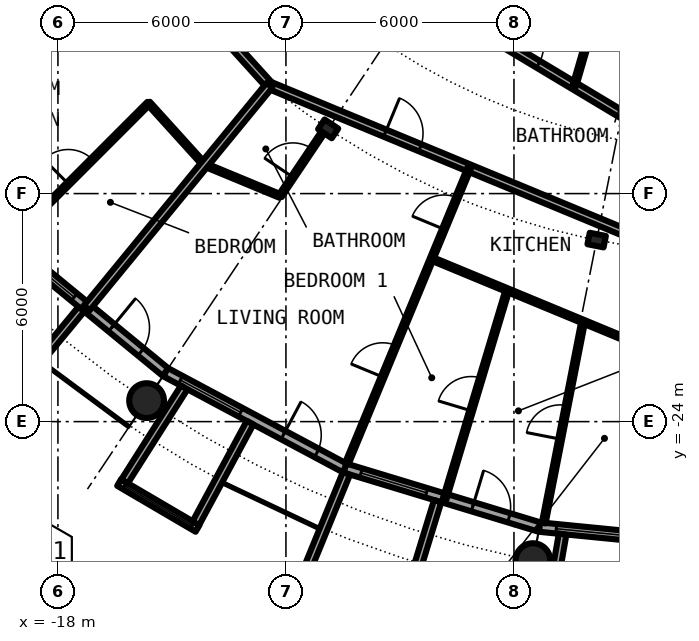
"""IFC4 building model, lengths in metres.
Left out: names, types, materials, properties, quantities, classifications, styles, units other than length and angle.
Written with IfcOpenShell. Run it as: python <this file> out.ifc"""

import sys

from ifc_helpers import new_model, si_unit, direction, frame, frame_2d, origin, origin_2d, place, context, subcontext, project, spatial, rectangle, circle, hollow_circle, i_section, extrude, element, fill, save


model = new_model("IFC4")
c1 = context("Model", 3, precision=1e-05, world=origin(), true_north=direction((0.0, 1.0)))
c2 = subcontext(c1, "Body", "Model", "MODEL_VIEW")
j1 = project(units=[si_unit("LENGTHUNIT", "METRE"), si_unit("PLANEANGLEUNIT", "RADIAN")], contexts=[c1])
p1 = place(None, origin())
s1 = spatial("IfcSite", under=j1, at=p1, CompositionType="ELEMENT")
p2 = place(p1, origin())
s2 = spatial("IfcBuilding", under=s1, at=p2, CompositionType="ELEMENT")
p3 = place(p2, frame((0.0, 0.0, 117.75)))
s3 = spatial("IfcBuildingStorey", under=s2, at=p3, CompositionType="ELEMENT", Elevation=117.75)
for number, where, z_axis, x_axis in (
    (1, (-15.667, -23.448, 0.0), (0.0, 0.0, 1.0), (1.0, 0.0, 0.0)),
    (2, (-5.501, -27.658, 0.0), (0.0, 0.0, 1.0), (1.0, 0.0, 0.0)),
):
    element("IfcColumn", number, at=place(p3, frame(where, z_axis=z_axis, x_axis=x_axis)), inside=s3, PredefinedType="COLUMN", context=c2, shape_type="SweptSolid", body=[
        extrude(hollow_circle(Radius=0.457, WallThickness=0.04, at=origin_2d()), origin(), (0.0, 0.0, 1.0), 3.05),
    ])
for number, where, z_axis, x_axis in (
    (3, (-10.889, -16.297, 0.0), (0.0, 0.0, 1.0), (-0.556, -0.831, 0.0)),
    (4, (-3.824, -19.223, 0.0), (0.0, 0.0, 1.0), (-0.195, -0.981, 0.0)),
):
    element("IfcColumn", number, at=place(p3, frame(where, z_axis=z_axis, x_axis=x_axis)), inside=s3, PredefinedType="COLUMN", context=c2, shape_type="SweptSolid", body=[
        extrude(i_section(OverallWidth=0.307, OverallDepth=0.432, WebThickness=0.021, FlangeThickness=0.04, FilletRadius=0.027, at=origin_2d()), origin(), (0.0, 0.0, 1.0), 3.05),
    ])
p4 = place(p3, frame((-19.304, -19.304, 0.0), z_axis=(0.0, 0.0, 1.0), x_axis=(0.773019449054, -0.634382322723, 0.0)))
e5 = element("IfcWall", 5, at=p4, inside=s3, PredefinedType="SOLIDWALL", context=c2, shape_type="SweptSolid", body=[
    extrude(rectangle(XDim=5.352, YDim=0.25, at=frame_2d((2.676, 0.0))), origin(), (0.0, 0.0, 1.0), 2.7),
])
p5 = place(p4, frame((0.441, 0.0, 0.3)))
e6 = element("IfcOpeningElement", 6, at=p5, cuts=e5, PredefinedType="OPENING", context=c2, shape_type="SweptSolid", body=[
    extrude(rectangle(XDim=1.8, YDim=2.1, at=frame_2d((0.9, 1.05))), frame((0.0, 0.135, 0.0), z_axis=(0.0, -1.0, 0.0), x_axis=(1.0, 0.0, 0.0)), (0.0, 0.0, 1.0), 0.27),
])
p6 = place(p4, frame((3.51, 0.0, 0.0)))
e7 = element("IfcOpeningElement", 7, at=p6, cuts=e5, PredefinedType="OPENING", context=c2, shape_type="SweptSolid", body=[
    extrude(rectangle(XDim=1.0, YDim=2.2, at=frame_2d((0.5, 1.1))), frame((0.0, 0.135, 0.0), z_axis=(0.0, -1.0, 0.0), x_axis=(1.0, 0.0, 0.0)), (0.0, 0.0, 1.0), 0.27),
])
p7 = place(p3, frame((-17.384, -21.041, -0.03), z_axis=(0.0, 0.0, 1.0), x_axis=(-0.63709551667, -0.770784861449, 0.0)))
e8 = element("IfcWall", 8, at=p7, inside=s3, PredefinedType="SOLIDWALL", context=c2, shape_type="SweptSolid", body=[
    extrude(rectangle(XDim=3.006, YDim=0.2, at=frame_2d((1.503, 0.0))), origin(), (0.0, 0.0, 1.0), 2.73),
])
p8 = place(p3, frame((-15.167, -22.699, 0.0), z_axis=(0.0, 0.0, 1.0), x_axis=(0.881915646801, -0.471407246368, 0.0)))
e9 = element("IfcWall", 9, at=p8, inside=s3, PredefinedType="SOLIDWALL", context=c2, shape_type="SweptSolid", body=[
    extrude(rectangle(XDim=5.352, YDim=0.25, at=frame_2d((2.676, 0.0))), origin(), (0.0, 0.0, 1.0), 2.7),
])
p9 = place(p8, frame((0.441, 0.0, 0.3)))
e10 = element("IfcOpeningElement", 10, at=p9, cuts=e9, PredefinedType="OPENING", context=c2, shape_type="SweptSolid", body=[
    extrude(rectangle(XDim=1.8, YDim=2.1, at=frame_2d((0.9, 1.05))), frame((0.0, 0.135, 0.0), z_axis=(0.0, -1.0, 0.0), x_axis=(1.0, 0.0, 0.0)), (0.0, 0.0, 1.0), 0.27),
])
p10 = place(p8, frame((3.51, 0.0, 0.0)))
e11 = element("IfcOpeningElement", 11, at=p10, cuts=e9, PredefinedType="OPENING", context=c2, shape_type="SweptSolid", body=[
    extrude(rectangle(XDim=1.0, YDim=2.2, at=frame_2d((0.5, 1.1))), frame((0.0, 0.135, 0.0), z_axis=(0.0, -1.0, 0.0), x_axis=(1.0, 0.0, 0.0)), (0.0, 0.0, 1.0), 0.27),
])
p11 = place(p3, frame((-16.39, -25.603, -0.03), z_axis=(0.0, 0.0, 1.0), x_axis=(0.862762477128, -0.505609442218, 0.0)))
e12 = element("IfcWall", 12, at=p11, inside=s3, PredefinedType="SOLIDWALL", context=c2, shape_type="SweptSolid", body=[
    extrude(rectangle(XDim=2.391, YDim=0.2, at=frame_2d((1.196, 0.0))), origin(), (0.0, 0.0, 1.0), 2.73),
])
p12 = place(p11, frame((0.156, 0.0, 0.33)))
e13 = element("IfcOpeningElement", 13, at=p12, cuts=e12, PredefinedType="OPENING", context=c2, shape_type="SweptSolid", body=[
    extrude(circle(Radius=1.04, at=frame_2d((1.04, 1.04))), frame((0.0, 0.11, 0.0), z_axis=(0.0, -1.0, 0.0), x_axis=(1.0, 0.0, 0.0)), (0.0, 0.0, 1.0), 0.22),
])
p13 = place(p3, frame((-14.678, -23.102, -0.03), z_axis=(0.0, 0.0, 1.0), x_axis=(-0.536001536573, -0.844217005746, 0.0)))
e14 = element("IfcWall", 14, at=p13, inside=s3, PredefinedType="SOLIDWALL", context=c2, shape_type="SweptSolid", body=[
    extrude(rectangle(XDim=2.929, YDim=0.2, at=frame_2d((1.465, 0.0))), origin(), (0.0, 0.0, 1.0), 2.73),
])
p14 = place(p3, frame((-12.945, -24.029, -0.03), z_axis=(0.0, 0.0, 1.0), x_axis=(-0.474424310775, -0.88029629861, 0.0)))
e15 = element("IfcWall", 15, at=p14, inside=s3, PredefinedType="SOLIDWALL", context=c2, shape_type="SweptSolid", body=[
    extrude(rectangle(XDim=3.006, YDim=0.2, at=frame_2d((1.503, 0.0))), origin(), (0.0, 0.0, 1.0), 2.73),
])
p15 = place(p3, frame((-10.447, -25.222, 0.0), z_axis=(0.0, 0.0, 1.0), x_axis=(0.956965678721, -0.290201119486, 0.0)))
e16 = element("IfcWall", 16, at=p15, inside=s3, PredefinedType="SOLIDWALL", context=c2, shape_type="SweptSolid", body=[
    extrude(rectangle(XDim=5.351, YDim=0.25, at=frame_2d((2.676, 0.0))), origin(), (0.0, 0.0, 1.0), 2.7),
])
p16 = place(p15, frame((0.441, 0.0, 0.3)))
e17 = element("IfcOpeningElement", 17, at=p16, cuts=e16, PredefinedType="OPENING", context=c2, shape_type="SweptSolid", body=[
    extrude(rectangle(XDim=1.8, YDim=2.1, at=frame_2d((0.9, 1.05))), frame((0.0, 0.135, 0.0), z_axis=(0.0, -1.0, 0.0), x_axis=(1.0, 0.0, 0.0)), (0.0, 0.0, 1.0), 0.27),
])
p17 = place(p15, frame((3.51, 0.0, 0.0)))
e18 = element("IfcOpeningElement", 18, at=p17, cuts=e16, PredefinedType="OPENING", context=c2, shape_type="SweptSolid", body=[
    extrude(rectangle(XDim=1.0, YDim=2.2, at=frame_2d((0.5, 1.1))), frame((0.0, 0.135, 0.0), z_axis=(0.0, -1.0, 0.0), x_axis=(1.0, 0.0, 0.0)), (0.0, 0.0, 1.0), 0.27),
])
p18 = place(p3, frame((-10.409, -25.364, -0.03), z_axis=(0.0, 0.0, 1.0), x_axis=(-0.379509886562, -0.925187681501, 0.0)))
e19 = element("IfcWall", 19, at=p18, inside=s3, PredefinedType="SOLIDWALL", context=c2, shape_type="SweptSolid", body=[
    extrude(rectangle(XDim=2.883, YDim=0.2, at=frame_2d((1.441, 0.0))), origin(), (0.0, 0.0, 1.0), 2.73),
])
p19 = place(p3, frame((-8.009, -26.092, -0.03), z_axis=(0.0, 0.0, 1.0), x_axis=(-0.293406695073, -0.955987715029, 0.0)))
e20 = element("IfcWall", 20, at=p19, inside=s3, PredefinedType="SOLIDWALL", context=c2, shape_type="SweptSolid", body=[
    extrude(rectangle(XDim=3.006, YDim=0.2, at=frame_2d((1.503, 0.0))), origin(), (0.0, 0.0, 1.0), 2.73),
])
p20 = place(p3, frame((-5.326, -26.775, 0.0), z_axis=(0.0, 0.0, 1.0), x_axis=(0.995173996315, -0.098126026407, 0.0)))
e21 = element("IfcWall", 21, at=p20, inside=s3, PredefinedType="SOLIDWALL", context=c2, shape_type="SweptSolid", body=[
    extrude(rectangle(XDim=5.352, YDim=0.25, at=frame_2d((2.676, 0.0))), origin(), (0.0, 0.0, 1.0), 2.7),
])
p21 = place(p20, frame((0.441, 0.0, 0.3)))
e22 = element("IfcOpeningElement", 22, at=p21, cuts=e21, PredefinedType="OPENING", context=c2, shape_type="SweptSolid", body=[
    extrude(rectangle(XDim=1.8, YDim=2.1, at=frame_2d((0.9, 1.05))), frame((0.0, 0.135, 0.0), z_axis=(0.0, -1.0, 0.0), x_axis=(1.0, 0.0, 0.0)), (0.0, 0.0, 1.0), 0.27),
])
p22 = place(p20, frame((3.51, 0.0, 0.0)))
e23 = element("IfcOpeningElement", 23, at=p22, cuts=e21, PredefinedType="OPENING", context=c2, shape_type="SweptSolid", body=[
    extrude(rectangle(XDim=1.0, YDim=2.2, at=frame_2d((0.5, 1.1))), frame((0.0, 0.135, 0.0), z_axis=(0.0, -1.0, 0.0), x_axis=(1.0, 0.0, 0.0)), (0.0, 0.0, 1.0), 0.27),
])
p23 = place(p3, frame((-4.72, -26.961, -0.03), z_axis=(0.0, 0.0, 1.0), x_axis=(-0.172463232037, -0.98501595601, 0.0)))
e24 = element("IfcWall", 24, at=p23, inside=s3, PredefinedType="SOLIDWALL", context=c2, shape_type="SweptSolid", body=[
    extrude(rectangle(XDim=2.929, YDim=0.2, at=frame_2d((1.464, 0.0))), origin(), (0.0, 0.0, 1.0), 2.73),
])
p24 = place(p3, frame((-15.617, -15.617, 0.0), z_axis=(0.0, 0.0, 1.0), x_axis=(0.671144831591, -0.741326254107, 0.0)))
e25 = element("IfcWall", 25, at=p24, inside=s3, PredefinedType="PARTITIONING", context=c2, shape_type="SweptSolid", body=[
    extrude(rectangle(XDim=2.181, YDim=0.1, at=frame_2d((1.091, 0.0))), origin(), (0.0, 0.0, 1.0), 2.7),
])
p25 = place(p3, frame((-14.147, -17.238, 0.0), z_axis=(0.0, 0.0, 1.0), x_axis=(0.923874819588, -0.382694810171, 0.0)))
e26 = element("IfcWall", 26, at=p25, inside=s3, PredefinedType="PARTITIONING", context=c2, shape_type="SweptSolid", body=[
    extrude(rectangle(XDim=2.158, YDim=0.1, at=frame_2d((1.079, 0.0))), origin(), (0.0, 0.0, 1.0), 2.7),
])
p26 = place(p3, frame((-8.164, -19.716, 0.0), z_axis=(0.0, 0.0, 1.0), x_axis=(0.92387253274, -0.38270033087, 0.0)))
e27 = element("IfcWall", 27, at=p26, inside=s3, PredefinedType="PARTITIONING", context=c2, shape_type="SweptSolid", body=[
    extrude(rectangle(XDim=6.475, YDim=0.1, at=frame_2d((3.238, 0.0))), origin(), (0.0, 0.0, 1.0), 2.7),
])
p27 = place(p3, frame((-16.192, -11.004, 0.0), z_axis=(0.0, 0.0, 1.0), x_axis=(0.671481997275, -0.741020868354, 0.0)))
e28 = element("IfcWall", 28, at=p27, inside=s3, PredefinedType="PARTITIONING", context=c2, shape_type="SweptSolid", body=[
    extrude(rectangle(XDim=5.596, YDim=0.2, at=frame_2d((2.798, 0.0))), origin(), (0.0, 0.0, 1.0), 2.39),
])
p28 = place(p27, frame((3.179, 0.0, 0.0)))
e29 = element("IfcOpeningElement", 29, at=p28, cuts=e28, PredefinedType="OPENING", context=c2, shape_type="SweptSolid", body=[
    extrude(rectangle(XDim=1.0, YDim=2.3, at=frame_2d((0.5, 1.15))), frame((0.0, 0.11, 0.0), z_axis=(0.0, -1.0, 0.0), x_axis=(1.0, 0.0, 0.0)), (0.0, 0.0, 1.0), 0.22),
])
p29 = place(p3, frame((-12.434, -15.151, 0.0), z_axis=(0.0, 0.0, 1.0), x_axis=(0.923888467236, -0.382661861319, 0.0)))
e30 = element("IfcWall", 30, at=p29, inside=s3, PredefinedType="PARTITIONING", context=c2, shape_type="SweptSolid", body=[
    extrude(rectangle(XDim=11.381, YDim=0.2, at=frame_2d((5.691, 0.0))), origin(), (0.0, 0.0, 1.0), 2.7),
])
p30 = place(p29, frame((3.292, 0.0, 0.0)))
e31 = element("IfcOpeningElement", 31, at=p30, cuts=e30, PredefinedType="OPENING", context=c2, shape_type="SweptSolid", body=[
    extrude(rectangle(XDim=1.0, YDim=2.3, at=frame_2d((0.5, 1.15))), frame((0.0, 0.11, 0.0), z_axis=(0.0, -1.0, 0.0), x_axis=(1.0, 0.0, 0.0)), (0.0, 0.0, 1.0), 0.22),
])
p31 = place(p3, frame((-14.051, -9.391, 0.0), z_axis=(0.0, 0.0, 1.0), x_axis=(0.857768591583, -0.514036033069, 0.0)))
e32 = element("IfcWall", 32, at=p31, inside=s3, PredefinedType="PARTITIONING", context=c2, shape_type="SweptSolid", body=[
    extrude(rectangle(XDim=14.45, YDim=0.2, at=frame_2d((7.225, 0.0))), origin(), (0.0, 0.0, 1.0), 2.7),
])
p32 = place(p31, frame((9.133, 0.0, 0.0)))
e33 = element("IfcOpeningElement", 33, at=p32, cuts=e32, PredefinedType="OPENING", context=c2, shape_type="SweptSolid", body=[
    extrude(rectangle(XDim=1.0, YDim=2.3, at=frame_2d((0.5, 1.15))), frame((0.0, 0.11, 0.0), z_axis=(0.0, -1.0, 0.0), x_axis=(1.0, 0.0, 0.0)), (0.0, 0.0, 1.0), 0.22),
])
p33 = place(p3, frame((-22.595, -15.097, 0.0), z_axis=(0.0, 0.0, 1.0), x_axis=(0.831467903109, 0.555572791, 0.0)))
e34 = element("IfcWall", 34, at=p33, inside=s3, PredefinedType="PARTITIONING", context=c2, shape_type="SweptSolid", body=[
    extrude(rectangle(XDim=7.358, YDim=0.2, at=frame_2d((3.679, 0.0))), origin(), (0.0, 0.0, 1.0), 2.7),
])
p34 = place(p3, frame((-19.21, -19.222, 0.0), z_axis=(0.0, 0.0, 1.0), x_axis=(0.706914880313, 0.707298629994, 0.0)))
e35 = element("IfcWall", 35, at=p34, inside=s3, PredefinedType="PARTITIONING", context=c2, shape_type="SweptSolid", body=[
    extrude(rectangle(XDim=5.09, YDim=0.1, at=frame_2d((2.545, 0.0))), origin(), (0.0, 0.0, 1.0), 2.7),
])
p35 = place(p34, frame((2.095, 0.0, 0.0)))
e36 = element("IfcOpeningElement", 36, at=p35, cuts=e35, PredefinedType="OPENING", context=c2, shape_type="SweptSolid", body=[
    extrude(rectangle(XDim=0.9, YDim=2.3, at=frame_2d((0.45, 1.15))), frame((0.0, 0.06, 0.0), z_axis=(0.0, -1.0, 0.0), x_axis=(1.0, 0.0, 0.0)), (0.0, 0.0, 1.0), 0.12),
])
p36 = place(p3, frame((-17.24, -21.007, 0.0), z_axis=(0.0, 0.0, 1.0), x_axis=(0.634381303318, 0.773020285633, 0.0)))
e37 = element("IfcWall", 37, at=p36, inside=s3, PredefinedType="PARTITIONING", context=c2, shape_type="SweptSolid", body=[
    extrude(rectangle(XDim=7.576, YDim=0.2, at=frame_2d((3.788, 0.0))), origin(), (0.0, 0.0, 1.0), 2.7),
])
p37 = place(p3, frame((-12.153, -18.064, 0.0), z_axis=(0.0, 0.0, 1.0), x_axis=(0.557893831879, 0.829912328112, 0.0)))
e38 = element("IfcWall", 38, at=p37, inside=s3, PredefinedType="PARTITIONING", context=c2, shape_type="SweptSolid", body=[
    extrude(rectangle(XDim=1.956, YDim=0.1, at=frame_2d((0.978, 0.0))), origin(), (0.0, 0.0, 1.0), 2.7),
])
p38 = place(p37, frame((0.6, 0.0, 0.0)))
e39 = element("IfcOpeningElement", 39, at=p38, cuts=e38, PredefinedType="OPENING", context=c2, shape_type="SweptSolid", body=[
    extrude(rectangle(XDim=0.9, YDim=2.3, at=frame_2d((0.45, 1.15))), frame((0.0, 0.06, 0.0), z_axis=(0.0, -1.0, 0.0), x_axis=(1.0, 0.0, 0.0)), (0.0, 0.0, 1.0), 0.12),
])
p39 = place(p3, frame((-10.399, -25.106, 0.0), z_axis=(0.0, 0.0, 1.0), x_axis=(0.382697543868, 0.923873687209, 0.0)))
e40 = element("IfcWall", 40, at=p39, inside=s3, PredefinedType="PARTITIONING", context=c2, shape_type="SweptSolid", body=[
    extrude(rectangle(XDim=8.419, YDim=0.1, at=frame_2d((4.209, 0.0))), origin(), (0.0, 0.0, 1.0), 2.7),
])
p40 = place(p39, frame((6.677, 0.0, 0.0)))
e41 = element("IfcOpeningElement", 41, at=p40, cuts=e40, PredefinedType="OPENING", context=c2, shape_type="SweptSolid", body=[
    extrude(rectangle(XDim=0.9, YDim=2.3, at=frame_2d((0.45, 1.15))), frame((0.0, 0.06, 0.0), z_axis=(0.0, -1.0, 0.0), x_axis=(1.0, 0.0, 0.0)), (0.0, 0.0, 1.0), 0.12),
])
p41 = place(p39, frame((2.468, 0.0, 0.0)))
e42 = element("IfcOpeningElement", 42, at=p41, cuts=e40, PredefinedType="OPENING", context=c2, shape_type="SweptSolid", body=[
    extrude(rectangle(XDim=0.9, YDim=2.3, at=frame_2d((0.45, 1.15))), frame((0.0, 0.06, 0.0), z_axis=(0.0, -1.0, 0.0), x_axis=(1.0, 0.0, 0.0)), (0.0, 0.0, 1.0), 0.12),
])
p42 = place(p3, frame((-7.821, -26.025, 0.0), z_axis=(0.0, 0.0, 1.0), x_axis=(0.287793773423, 0.957692405723, 0.0)))
e43 = element("IfcWall", 43, at=p42, inside=s3, PredefinedType="PARTITIONING", context=c2, shape_type="SweptSolid", body=[
    extrude(rectangle(XDim=5.726, YDim=0.1, at=frame_2d((2.863, 0.0))), origin(), (0.0, 0.0, 1.0), 2.7),
])
p43 = place(p42, frame((2.413, 0.0, 0.0)))
e44 = element("IfcOpeningElement", 44, at=p43, cuts=e43, PredefinedType="OPENING", context=c2, shape_type="SweptSolid", body=[
    extrude(rectangle(XDim=0.9, YDim=2.3, at=frame_2d((0.45, 1.15))), frame((0.0, 0.06, 0.0), z_axis=(0.0, -1.0, 0.0), x_axis=(1.0, 0.0, 0.0)), (0.0, 0.0, 1.0), 0.12),
])
p44 = place(p3, frame((-5.217, -26.67, 0.0), z_axis=(0.0, 0.0, 1.0), x_axis=(0.192109041462, 0.981373586453, 0.0)))
e45 = element("IfcWall", 45, at=p44, inside=s3, PredefinedType="PARTITIONING", context=c2, shape_type="SweptSolid", body=[
    extrude(rectangle(XDim=5.404, YDim=0.1, at=frame_2d((2.702, 0.0))), origin(), (0.0, 0.0, 1.0), 2.7),
])
p45 = place(p44, frame((2.252, 0.0, 0.0)))
e46 = element("IfcOpeningElement", 46, at=p45, cuts=e45, PredefinedType="OPENING", context=c2, shape_type="SweptSolid", body=[
    extrude(rectangle(XDim=0.9, YDim=2.3, at=frame_2d((0.45, 1.15))), frame((0.0, 0.06, 0.0), z_axis=(0.0, -1.0, 0.0), x_axis=(1.0, 0.0, 0.0)), (0.0, 0.0, 1.0), 0.12),
])
p46 = place(p3, frame((-4.411, -15.168, 0.0), z_axis=(0.0, 0.0, 1.0), x_axis=(0.279201466266, 0.960232545395, 0.0)))
e47 = element("IfcWall", 47, at=p46, inside=s3, PredefinedType="PARTITIONING", context=c2, shape_type="SweptSolid", body=[
    extrude(rectangle(XDim=2.524, YDim=0.1, at=frame_2d((1.262, 0.0))), origin(), (0.0, 0.0, 1.0), 2.7),
])
p47 = place(p5, origin())
e48 = element("IfcWindow", 48, at=p47, inside=s3, PartitioningType="SINGLE_PANEL", PredefinedType="WINDOW", context=c2, shape_type="SweptSolid", body=[
    extrude(rectangle(XDim=1.8, YDim=2.1, at=frame_2d((0.9, 1.05))), frame((0.0, 0.03, 0.0), z_axis=(0.0, -1.0, 0.0), x_axis=(1.0, 0.0, 0.0)), (0.0, 0.0, 1.0), 0.06),
])
fill(e6, e48)
p48 = place(p6, origin())
e49 = element("IfcDoor", 49, at=p48, inside=s3, OperationType="SINGLE_SWING_LEFT", PredefinedType="DOOR", context=c2, shape_type="SweptSolid", body=[
    extrude(rectangle(XDim=1.0, YDim=2.2, at=frame_2d((0.5, 1.1))), frame((0.0, 0.025, 0.0), z_axis=(0.0, -1.0, 0.0), x_axis=(1.0, 0.0, 0.0)), (0.0, 0.0, 1.0), 0.05),
])
fill(e7, e49)
p49 = place(p9, origin())
e50 = element("IfcWindow", 50, at=p49, inside=s3, PartitioningType="SINGLE_PANEL", PredefinedType="WINDOW", context=c2, shape_type="SweptSolid", body=[
    extrude(rectangle(XDim=1.8, YDim=2.1, at=frame_2d((0.9, 1.05))), frame((0.0, 0.03, 0.0), z_axis=(0.0, -1.0, 0.0), x_axis=(1.0, 0.0, 0.0)), (0.0, 0.0, 1.0), 0.06),
])
fill(e10, e50)
p50 = place(p12, origin())
e51 = element("IfcWindow", 51, at=p50, inside=s3, PartitioningType="SINGLE_PANEL", PredefinedType="WINDOW", context=c2, shape_type="SweptSolid", body=[
    extrude(circle(Radius=1.04, at=frame_2d((1.04, 1.04))), frame((0.0, 0.03, 0.0), z_axis=(0.0, -1.0, 0.0), x_axis=(1.0, 0.0, 0.0)), (0.0, 0.0, 1.0), 0.06),
])
fill(e13, e51)
p51 = place(p10, origin())
e52 = element("IfcDoor", 52, at=p51, inside=s3, OperationType="SINGLE_SWING_LEFT", PredefinedType="DOOR", context=c2, shape_type="SweptSolid", body=[
    extrude(rectangle(XDim=1.0, YDim=2.2, at=frame_2d((0.5, 1.1))), frame((0.0, 0.025, 0.0), z_axis=(0.0, -1.0, 0.0), x_axis=(1.0, 0.0, 0.0)), (0.0, 0.0, 1.0), 0.05),
])
fill(e11, e52)
p52 = place(p16, origin())
e53 = element("IfcWindow", 53, at=p52, inside=s3, PartitioningType="SINGLE_PANEL", PredefinedType="WINDOW", context=c2, shape_type="SweptSolid", body=[
    extrude(rectangle(XDim=1.8, YDim=2.1, at=frame_2d((0.9, 1.05))), frame((0.0, 0.03, 0.0), z_axis=(0.0, -1.0, 0.0), x_axis=(1.0, 0.0, 0.0)), (0.0, 0.0, 1.0), 0.06),
])
fill(e17, e53)
p53 = place(p17, origin())
e54 = element("IfcDoor", 54, at=p53, inside=s3, OperationType="SINGLE_SWING_LEFT", PredefinedType="DOOR", context=c2, shape_type="SweptSolid", body=[
    extrude(rectangle(XDim=1.0, YDim=2.2, at=frame_2d((0.5, 1.1))), frame((0.0, 0.025, 0.0), z_axis=(0.0, -1.0, 0.0), x_axis=(1.0, 0.0, 0.0)), (0.0, 0.0, 1.0), 0.05),
])
fill(e18, e54)
p54 = place(p21, origin())
e55 = element("IfcWindow", 55, at=p54, inside=s3, PartitioningType="SINGLE_PANEL", PredefinedType="WINDOW", context=c2, shape_type="SweptSolid", body=[
    extrude(rectangle(XDim=1.8, YDim=2.1, at=frame_2d((0.9, 1.05))), frame((0.0, 0.03, 0.0), z_axis=(0.0, -1.0, 0.0), x_axis=(1.0, 0.0, 0.0)), (0.0, 0.0, 1.0), 0.06),
])
fill(e22, e55)
p55 = place(p35, origin())
e56 = element("IfcDoor", 56, at=p55, inside=s3, OperationType="SINGLE_SWING_RIGHT", PredefinedType="DOOR", context=c2, shape_type="SweptSolid", body=[
    extrude(rectangle(XDim=0.9, YDim=2.3, at=frame_2d((0.45, 1.15))), frame((0.0, 0.025, 0.0), z_axis=(0.0, -1.0, 0.0), x_axis=(1.0, 0.0, 0.0)), (0.0, 0.0, 1.0), 0.05),
])
fill(e36, e56)
p56 = place(p30, origin())
e57 = element("IfcDoor", 57, at=p56, inside=s3, OperationType="SINGLE_SWING_LEFT", PredefinedType="DOOR", context=c2, shape_type="SweptSolid", body=[
    extrude(rectangle(XDim=1.0, YDim=2.3, at=frame_2d((0.5, 1.15))), frame((0.0, 0.025, 0.0), z_axis=(0.0, -1.0, 0.0), x_axis=(1.0, 0.0, 0.0)), (0.0, 0.0, 1.0), 0.05),
])
fill(e31, e57)
p57 = place(p38, origin())
e58 = element("IfcDoor", 58, at=p57, inside=s3, OperationType="SINGLE_SWING_RIGHT", PredefinedType="DOOR", context=c2, shape_type="SweptSolid", body=[
    extrude(rectangle(XDim=0.9, YDim=2.3, at=frame_2d((0.45, 1.15))), frame((0.0, 0.025, 0.0), z_axis=(0.0, -1.0, 0.0), x_axis=(1.0, 0.0, 0.0)), (0.0, 0.0, 1.0), 0.05),
])
fill(e39, e58)
p58 = place(p40, origin())
e59 = element("IfcDoor", 59, at=p58, inside=s3, OperationType="SINGLE_SWING_RIGHT", PredefinedType="DOOR", context=c2, shape_type="SweptSolid", body=[
    extrude(rectangle(XDim=0.9, YDim=2.3, at=frame_2d((0.45, 1.15))), frame((0.0, 0.025, 0.0), z_axis=(0.0, -1.0, 0.0), x_axis=(1.0, 0.0, 0.0)), (0.0, 0.0, 1.0), 0.05),
])
fill(e41, e59)
p59 = place(p41, origin())
e60 = element("IfcDoor", 60, at=p59, inside=s3, OperationType="SINGLE_SWING_LEFT", PredefinedType="DOOR", context=c2, shape_type="SweptSolid", body=[
    extrude(rectangle(XDim=0.9, YDim=2.3, at=frame_2d((0.45, 1.15))), frame((0.0, 0.025, 0.0), z_axis=(0.0, -1.0, 0.0), x_axis=(1.0, 0.0, 0.0)), (0.0, 0.0, 1.0), 0.05),
])
fill(e42, e60)
p60 = place(p43, origin())
e61 = element("IfcDoor", 61, at=p60, inside=s3, OperationType="SINGLE_SWING_LEFT", PredefinedType="DOOR", context=c2, shape_type="SweptSolid", body=[
    extrude(rectangle(XDim=0.9, YDim=2.3, at=frame_2d((0.45, 1.15))), frame((0.0, 0.025, 0.0), z_axis=(0.0, -1.0, 0.0), x_axis=(1.0, 0.0, 0.0)), (0.0, 0.0, 1.0), 0.05),
])
fill(e44, e61)
p61 = place(p45, origin())
e62 = element("IfcDoor", 62, at=p61, inside=s3, OperationType="SINGLE_SWING_RIGHT", PredefinedType="DOOR", context=c2, shape_type="SweptSolid", body=[
    extrude(rectangle(XDim=0.9, YDim=2.3, at=frame_2d((0.45, 1.15))), frame((0.0, 0.025, 0.0), z_axis=(0.0, -1.0, 0.0), x_axis=(1.0, 0.0, 0.0)), (0.0, 0.0, 1.0), 0.05),
])
fill(e46, e62)
p62 = place(p32, origin())
e63 = element("IfcDoor", 63, at=p62, inside=s3, OperationType="SINGLE_SWING_RIGHT", PredefinedType="DOOR", context=c2, shape_type="SweptSolid", body=[
    extrude(rectangle(XDim=1.0, YDim=2.3, at=frame_2d((0.5, 1.15))), frame((0.0, 0.025, 0.0), z_axis=(0.0, -1.0, 0.0), x_axis=(1.0, 0.0, 0.0)), (0.0, 0.0, 1.0), 0.05),
])
fill(e33, e63)
save(model, sys.argv[1])
